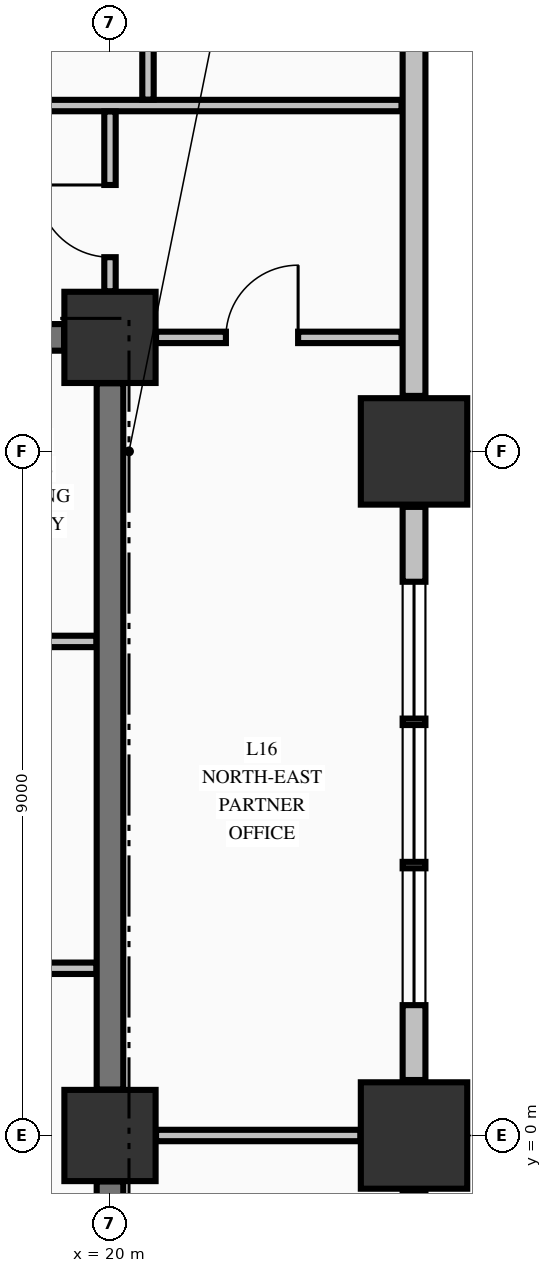
"""IFC4 building model, lengths in metres.
Left out: names, types, materials, properties, quantities, classifications, styles, units other than length and angle.
Written with IfcOpenShell. Run it as: python <this file> out.ifc"""

import sys

from ifc_helpers import new_model, si_unit, direction, frame, frame_2d, origin, origin_2d, place, context, subcontext, project, spatial, rectangle, extrude, element, fill, save


model = new_model("IFC4")
c1 = context("Model", 3, precision=1e-05, world=origin(), true_north=direction((0.0, 1.0)))
c2 = subcontext(c1, "Body", "Model", "MODEL_VIEW")
j1 = project(units=[si_unit("LENGTHUNIT", "METRE"), si_unit("PLANEANGLEUNIT", "RADIAN")], contexts=[c1])
p1 = place(None, origin())
s1 = spatial("IfcSite", under=j1, at=p1, CompositionType="ELEMENT")
p2 = place(p1, origin())
s2 = spatial("IfcBuilding", under=s1, at=p2, CompositionType="ELEMENT")
p3 = place(p2, frame((0.0, 0.0, 67.9)))
s3 = spatial("IfcBuildingStorey", under=s2, at=p3, CompositionType="ELEMENT", Elevation=67.9)
for number, where, z_axis, x_axis in (
    (1, (24.0, 0.0, -0.25), (0.0, 0.0, 1.0), (1.0, 0.0, 0.0)),
    (2, (24.0, 9.0, -0.25), (0.0, 0.0, 1.0), (1.0, 0.0, 0.0)),
):
    element("IfcColumn", number, at=place(p3, frame(where, z_axis=z_axis, x_axis=x_axis)), inside=s3, PredefinedType="COLUMN", context=c2, shape_type="SweptSolid", body=[
        extrude(rectangle(XDim=1.4, YDim=1.4, at=origin_2d()), origin(), (0.0, 0.0, 1.0), 3.495),
    ])
for number, where, z_axis, x_axis in (
    (3, (20.0, 10.5, -0.25), (0.0, 0.0, 1.0), (1.0, 0.0, 0.0)),
    (4, (20.0, 0.0, -0.25), (0.0, 0.0, 1.0), (1.0, 0.0, 0.0)),
):
    element("IfcColumn", number, at=place(p3, frame(where, z_axis=z_axis, x_axis=x_axis)), inside=s3, PredefinedType="COLUMN", context=c2, shape_type="SweptSolid", body=[
        extrude(rectangle(XDim=1.2, YDim=1.2, at=origin_2d()), origin(), (0.0, 0.0, 1.0), 3.495),
    ])
p4 = place(p3, frame((24.0, -8.27, 0.0), z_axis=(0.0, 0.0, 1.0), x_axis=(0.0, 1.0, 0.0)))
e5 = element("IfcWall", 5, at=p4, inside=s3, PredefinedType="STANDARD", context=c2, shape_type="SweptSolid", body=[
    extrude(rectangle(XDim=7.54, YDim=0.3, at=frame_2d((3.77, 0.0))), origin(), (0.0, 0.0, 1.0), 2.637),
])
p5 = place(p4, frame((0.985, 0.0, 0.78)))
e6 = element("IfcOpeningElement", 6, at=p5, cuts=e5, PredefinedType="OPENING", context=c2, shape_type="SweptSolid", body=[
    extrude(rectangle(XDim=1.8, YDim=1.72, at=frame_2d((0.9, 0.86))), frame((0.0, 0.16, 0.0), z_axis=(0.0, -1.0, 0.0), x_axis=(1.0, 0.0, 0.0)), (0.0, 0.0, 1.0), 0.32),
])
p6 = place(p4, frame((2.87, 0.0, 0.78)))
e7 = element("IfcOpeningElement", 7, at=p6, cuts=e5, PredefinedType="OPENING", context=c2, shape_type="SweptSolid", body=[
    extrude(rectangle(XDim=1.8, YDim=1.72, at=frame_2d((0.9, 0.86))), frame((0.0, 0.16, 0.0), z_axis=(0.0, -1.0, 0.0), x_axis=(1.0, 0.0, 0.0)), (0.0, 0.0, 1.0), 0.32),
])
p7 = place(p4, frame((4.755, 0.0, 0.78)))
e8 = element("IfcOpeningElement", 8, at=p7, cuts=e5, PredefinedType="OPENING", context=c2, shape_type="SweptSolid", body=[
    extrude(rectangle(XDim=1.8, YDim=1.72, at=frame_2d((0.9, 0.86))), frame((0.0, 0.16, 0.0), z_axis=(0.0, -1.0, 0.0), x_axis=(1.0, 0.0, 0.0)), (0.0, 0.0, 1.0), 0.32),
])
p8 = place(p3, frame((24.0, 0.73, 0.0), z_axis=(0.0, 0.0, 1.0), x_axis=(0.0, 1.0, 0.0)))
e9 = element("IfcWall", 9, at=p8, inside=s3, PredefinedType="STANDARD", context=c2, shape_type="SweptSolid", body=[
    extrude(rectangle(XDim=7.54, YDim=0.3, at=frame_2d((3.77, 0.0))), origin(), (0.0, 0.0, 1.0), 2.637),
])
p9 = place(p8, frame((0.985, 0.0, 0.78)))
e10 = element("IfcOpeningElement", 10, at=p9, cuts=e9, PredefinedType="OPENING", context=c2, shape_type="SweptSolid", body=[
    extrude(rectangle(XDim=1.8, YDim=1.72, at=frame_2d((0.9, 0.86))), frame((0.0, 0.16, 0.0), z_axis=(0.0, -1.0, 0.0), x_axis=(1.0, 0.0, 0.0)), (0.0, 0.0, 1.0), 0.32),
])
p10 = place(p8, frame((2.87, 0.0, 0.78)))
e11 = element("IfcOpeningElement", 11, at=p10, cuts=e9, PredefinedType="OPENING", context=c2, shape_type="SweptSolid", body=[
    extrude(rectangle(XDim=1.8, YDim=1.72, at=frame_2d((0.9, 0.86))), frame((0.0, 0.16, 0.0), z_axis=(0.0, -1.0, 0.0), x_axis=(1.0, 0.0, 0.0)), (0.0, 0.0, 1.0), 0.32),
])
p11 = place(p8, frame((4.755, 0.0, 0.78)))
e12 = element("IfcOpeningElement", 12, at=p11, cuts=e9, PredefinedType="OPENING", context=c2, shape_type="SweptSolid", body=[
    extrude(rectangle(XDim=1.8, YDim=1.72, at=frame_2d((0.9, 0.86))), frame((0.0, 0.16, 0.0), z_axis=(0.0, -1.0, 0.0), x_axis=(1.0, 0.0, 0.0)), (0.0, 0.0, 1.0), 0.32),
])
p12 = place(p3, frame((24.0, 9.73, 0.0), z_axis=(0.0, 0.0, 1.0), x_axis=(0.0, 1.0, 0.0)))
e13 = element("IfcWall", 13, at=p12, inside=s3, PredefinedType="STANDARD", context=c2, shape_type="SweptSolid", body=[
    extrude(rectangle(XDim=12.54, YDim=0.3, at=frame_2d((6.27, 0.0))), origin(), (0.0, 0.0, 1.0), 2.637),
])
p13 = place(p3, frame((14.7, 10.5, 0.0), z_axis=(0.0, 0.0, 1.0), x_axis=(1.0, 0.0, 0.0)))
e14 = element("IfcWall", 14, at=p13, inside=s3, PredefinedType="SHEAR", context=c2, shape_type="SweptSolid", body=[
    extrude(rectangle(XDim=4.696, YDim=0.35, at=frame_2d((2.348, 0.0))), origin(), (0.0, 0.0, 1.0), 3.245),
])
p14 = place(p13, frame((0.6, 0.0, 0.0)))
e15 = element("IfcOpeningElement", 15, at=p14, cuts=e14, PredefinedType="OPENING", context=c2, shape_type="SweptSolid", body=[
    extrude(rectangle(XDim=0.9, YDim=2.15, at=frame_2d((0.45, 1.075))), frame((0.0, 0.185, 0.0), z_axis=(0.0, -1.0, 0.0), x_axis=(1.0, 0.0, 0.0)), (0.0, 0.0, 1.0), 0.37),
])
p15 = place(p3, frame((20.606, 0.0, 0.0), z_axis=(0.0, 0.0, 1.0), x_axis=(1.0, 0.0, 0.0)))
e16 = element("IfcWall", 16, at=p15, inside=s3, PredefinedType="PARTITIONING", context=c2, shape_type="SweptSolid", body=[
    extrude(rectangle(XDim=2.688, YDim=0.15, at=frame_2d((1.344, 0.0))), origin(), (0.0, 0.0, 1.0), 2.585),
])
p16 = place(p3, frame((14.878, 2.2, 0.0), z_axis=(0.0, 0.0, 1.0), x_axis=(1.0, 0.0, 0.0)))
e17 = element("IfcWall", 17, at=p16, inside=s3, PredefinedType="PARTITIONING", context=c2, shape_type="SweptSolid", body=[
    extrude(rectangle(XDim=4.944, YDim=0.15, at=frame_2d((2.472, 0.0))), origin(), (0.0, 0.0, 1.0), 3.245),
])
p17 = place(p16, frame((0.397, 0.0, 0.0)))
e18 = element("IfcOpeningElement", 18, at=p17, cuts=e17, PredefinedType="OPENING", context=c2, shape_type="SweptSolid", body=[
    extrude(rectangle(XDim=0.95, YDim=2.15, at=frame_2d((0.475, 1.075))), frame((0.0, 0.085, 0.0), z_axis=(0.0, -1.0, 0.0), x_axis=(1.0, 0.0, 0.0)), (0.0, 0.0, 1.0), 0.17),
])
p18 = place(p3, frame((14.878, 6.5, 0.0), z_axis=(0.0, 0.0, 1.0), x_axis=(1.0, 0.0, 0.0)))
e19 = element("IfcWall", 19, at=p18, inside=s3, PredefinedType="PARTITIONING", context=c2, shape_type="SweptSolid", body=[
    extrude(rectangle(XDim=4.944, YDim=0.15, at=frame_2d((2.472, 0.0))), origin(), (0.0, 0.0, 1.0), 3.245),
])
p19 = place(p18, frame((0.397, 0.0, 0.0)))
e20 = element("IfcOpeningElement", 20, at=p19, cuts=e19, PredefinedType="OPENING", context=c2, shape_type="SweptSolid", body=[
    extrude(rectangle(XDim=0.95, YDim=2.15, at=frame_2d((0.475, 1.075))), frame((0.0, 0.085, 0.0), z_axis=(0.0, -1.0, 0.0), x_axis=(1.0, 0.0, 0.0)), (0.0, 0.0, 1.0), 0.17),
])
p20 = place(p18, frame((3.047, 0.0, 0.0)))
e21 = element("IfcOpeningElement", 21, at=p20, cuts=e19, PredefinedType="OPENING", context=c2, shape_type="SweptSolid", body=[
    extrude(rectangle(XDim=0.95, YDim=2.15, at=frame_2d((0.475, 1.075))), frame((0.0, 0.085, 0.0), z_axis=(0.0, -1.0, 0.0), x_axis=(1.0, 0.0, 0.0)), (0.0, 0.0, 1.0), 0.17),
])
p21 = place(p3, frame((20.606, 10.5, 0.0), z_axis=(0.0, 0.0, 1.0), x_axis=(1.0, 0.0, 0.0)))
e22 = element("IfcWall", 22, at=p21, inside=s3, PredefinedType="PARTITIONING", context=c2, shape_type="SweptSolid", body=[
    extrude(rectangle(XDim=3.229, YDim=0.15, at=frame_2d((1.615, 0.0))), origin(), (0.0, 0.0, 1.0), 3.245),
])
p22 = place(p21, frame((0.919, 0.0, 0.0)))
e23 = element("IfcOpeningElement", 23, at=p22, cuts=e22, PredefinedType="OPENING", context=c2, shape_type="SweptSolid", body=[
    extrude(rectangle(XDim=0.95, YDim=2.15, at=frame_2d((0.475, 1.075))), frame((0.0, 0.085, 0.0), z_axis=(0.0, -1.0, 0.0), x_axis=(1.0, 0.0, 0.0)), (0.0, 0.0, 1.0), 0.17),
])
p23 = place(p3, frame((-28.835, 13.55, 0.0), z_axis=(0.0, 0.0, 1.0), x_axis=(1.0, 0.0, 0.0)))
e24 = element("IfcWall", 24, at=p23, inside=s3, PredefinedType="PARTITIONING", context=c2, shape_type="SweptSolid", body=[
    extrude(rectangle(XDim=52.67, YDim=0.15, at=frame_2d((26.335, 0.0))), origin(), (0.0, 0.0, 1.0), 3.245),
])
p24 = place(p23, frame((11.38, 0.0, 0.0)))
e25 = element("IfcOpeningElement", 25, at=p24, cuts=e24, PredefinedType="OPENING", context=c2, shape_type="SweptSolid", body=[
    extrude(rectangle(XDim=1.05, YDim=2.15, at=frame_2d((0.525, 1.075))), frame((0.0, 0.085, 0.0), z_axis=(0.0, -1.0, 0.0), x_axis=(1.0, 0.0, 0.0)), (0.0, 0.0, 1.0), 0.17),
])
p25 = place(p23, frame((15.91, 0.0, 0.0)))
e26 = element("IfcOpeningElement", 26, at=p25, cuts=e24, PredefinedType="OPENING", context=c2, shape_type="SweptSolid", body=[
    extrude(rectangle(XDim=1.05, YDim=2.15, at=frame_2d((0.525, 1.075))), frame((0.0, 0.085, 0.0), z_axis=(0.0, -1.0, 0.0), x_axis=(1.0, 0.0, 0.0)), (0.0, 0.0, 1.0), 0.17),
])
p26 = place(p23, frame((26.66, 0.0, 0.0)))
e27 = element("IfcOpeningElement", 27, at=p26, cuts=e24, PredefinedType="OPENING", context=c2, shape_type="SweptSolid", body=[
    extrude(rectangle(XDim=1.05, YDim=2.15, at=frame_2d((0.525, 1.075))), frame((0.0, 0.085, 0.0), z_axis=(0.0, -1.0, 0.0), x_axis=(1.0, 0.0, 0.0)), (0.0, 0.0, 1.0), 0.17),
])
p27 = place(p23, frame((35.56, 0.0, 0.0)))
e28 = element("IfcOpeningElement", 28, at=p27, cuts=e24, PredefinedType="OPENING", context=c2, shape_type="SweptSolid", body=[
    extrude(rectangle(XDim=1.05, YDim=2.15, at=frame_2d((0.525, 1.075))), frame((0.0, 0.085, 0.0), z_axis=(0.0, -1.0, 0.0), x_axis=(1.0, 0.0, 0.0)), (0.0, 0.0, 1.0), 0.17),
])
p28 = place(p23, frame((44.19, 0.0, 0.0)))
e29 = element("IfcOpeningElement", 29, at=p28, cuts=e24, PredefinedType="OPENING", context=c2, shape_type="SweptSolid", body=[
    extrude(rectangle(XDim=1.05, YDim=2.15, at=frame_2d((0.525, 1.075))), frame((0.0, 0.085, 0.0), z_axis=(0.0, -1.0, 0.0), x_axis=(1.0, 0.0, 0.0)), (0.0, 0.0, 1.0), 0.17),
])
p29 = place(p3, frame((20.0, -4.423, 0.0), z_axis=(0.0, 0.0, 1.0), x_axis=(0.0, 1.0, 0.0)))
e30 = element("IfcWall", 30, at=p29, inside=s3, PredefinedType="SHEAR", context=c2, shape_type="SweptSolid", body=[
    extrude(rectangle(XDim=3.819, YDim=0.35, at=frame_2d((1.91, 0.0))), origin(), (0.0, 0.0, 1.0), 3.245),
])
p30 = place(p3, frame((20.0, 0.604, 0.0), z_axis=(0.0, 0.0, 1.0), x_axis=(0.0, 1.0, 0.0)))
e31 = element("IfcWall", 31, at=p30, inside=s3, PredefinedType="SHEAR", context=c2, shape_type="SweptSolid", body=[
    extrude(rectangle(XDim=9.292, YDim=0.35, at=frame_2d((4.646, 0.0))), origin(), (0.0, 0.0, 1.0), 3.245),
])
p31 = place(p3, frame((20.0, 11.106, 0.0), z_axis=(0.0, 0.0, 1.0), x_axis=(0.0, 1.0, 0.0)))
e32 = element("IfcWall", 32, at=p31, inside=s3, PredefinedType="PARTITIONING", context=c2, shape_type="SweptSolid", body=[
    extrude(rectangle(XDim=2.366, YDim=0.15, at=frame_2d((1.183, 0.0))), origin(), (0.0, 0.0, 1.0), 3.245),
])
p32 = place(p31, frame((0.449, 0.0, 0.0)))
e33 = element("IfcOpeningElement", 33, at=p32, cuts=e32, PredefinedType="OPENING", context=c2, shape_type="SweptSolid", body=[
    extrude(rectangle(XDim=0.95, YDim=2.15, at=frame_2d((0.475, 1.075))), frame((0.0, 0.085, 0.0), z_axis=(0.0, -1.0, 0.0), x_axis=(1.0, 0.0, 0.0)), (0.0, 0.0, 1.0), 0.17),
])
p33 = place(p3, frame((20.5, 13.628, 0.0), z_axis=(0.0, 0.0, 1.0), x_axis=(0.0, 1.0, 0.0)))
e34 = element("IfcWall", 34, at=p33, inside=s3, PredefinedType="PARTITIONING", context=c2, shape_type="SweptSolid", body=[
    extrude(rectangle(XDim=8.666, YDim=0.15, at=frame_2d((4.333, 0.0))), origin(), (0.0, 0.0, 1.0), 3.245),
])
p34 = place(p9, origin())
e35 = element("IfcWindow", 35, at=p34, inside=s3, PartitioningType="SINGLE_PANEL", PredefinedType="WINDOW", context=c2, shape_type="SweptSolid", body=[
    extrude(rectangle(XDim=1.8, YDim=1.72, at=frame_2d((0.9, 0.86))), frame((0.0, 0.03, 0.0), z_axis=(0.0, -1.0, 0.0), x_axis=(1.0, 0.0, 0.0)), (0.0, 0.0, 1.0), 0.06),
])
fill(e10, e35)
p35 = place(p10, origin())
e36 = element("IfcWindow", 36, at=p35, inside=s3, PartitioningType="SINGLE_PANEL", PredefinedType="WINDOW", context=c2, shape_type="SweptSolid", body=[
    extrude(rectangle(XDim=1.8, YDim=1.72, at=frame_2d((0.9, 0.86))), frame((0.0, 0.03, 0.0), z_axis=(0.0, -1.0, 0.0), x_axis=(1.0, 0.0, 0.0)), (0.0, 0.0, 1.0), 0.06),
])
fill(e11, e36)
p36 = place(p11, origin())
e37 = element("IfcWindow", 37, at=p36, inside=s3, PartitioningType="SINGLE_PANEL", PredefinedType="WINDOW", context=c2, shape_type="SweptSolid", body=[
    extrude(rectangle(XDim=1.8, YDim=1.72, at=frame_2d((0.9, 0.86))), frame((0.0, 0.03, 0.0), z_axis=(0.0, -1.0, 0.0), x_axis=(1.0, 0.0, 0.0)), (0.0, 0.0, 1.0), 0.06),
])
fill(e12, e37)
p37 = place(p32, origin())
e38 = element("IfcDoor", 38, at=p37, inside=s3, OperationType="SINGLE_SWING_RIGHT", PredefinedType="DOOR", context=c2, shape_type="SweptSolid", body=[
    extrude(rectangle(XDim=0.95, YDim=2.15, at=frame_2d((0.475, 1.075))), frame((0.0, 0.025, 0.0), z_axis=(0.0, -1.0, 0.0), x_axis=(1.0, 0.0, 0.0)), (0.0, 0.0, 1.0), 0.05),
])
fill(e33, e38)
p38 = place(p22, origin())
e39 = element("IfcDoor", 39, at=p38, inside=s3, OperationType="SINGLE_SWING_RIGHT", PredefinedType="DOOR", context=c2, shape_type="SweptSolid", body=[
    extrude(rectangle(XDim=0.95, YDim=2.15, at=frame_2d((0.475, 1.075))), frame((0.0, 0.025, 0.0), z_axis=(0.0, -1.0, 0.0), x_axis=(1.0, 0.0, 0.0)), (0.0, 0.0, 1.0), 0.05),
])
fill(e23, e39)
save(model, sys.argv[1])
